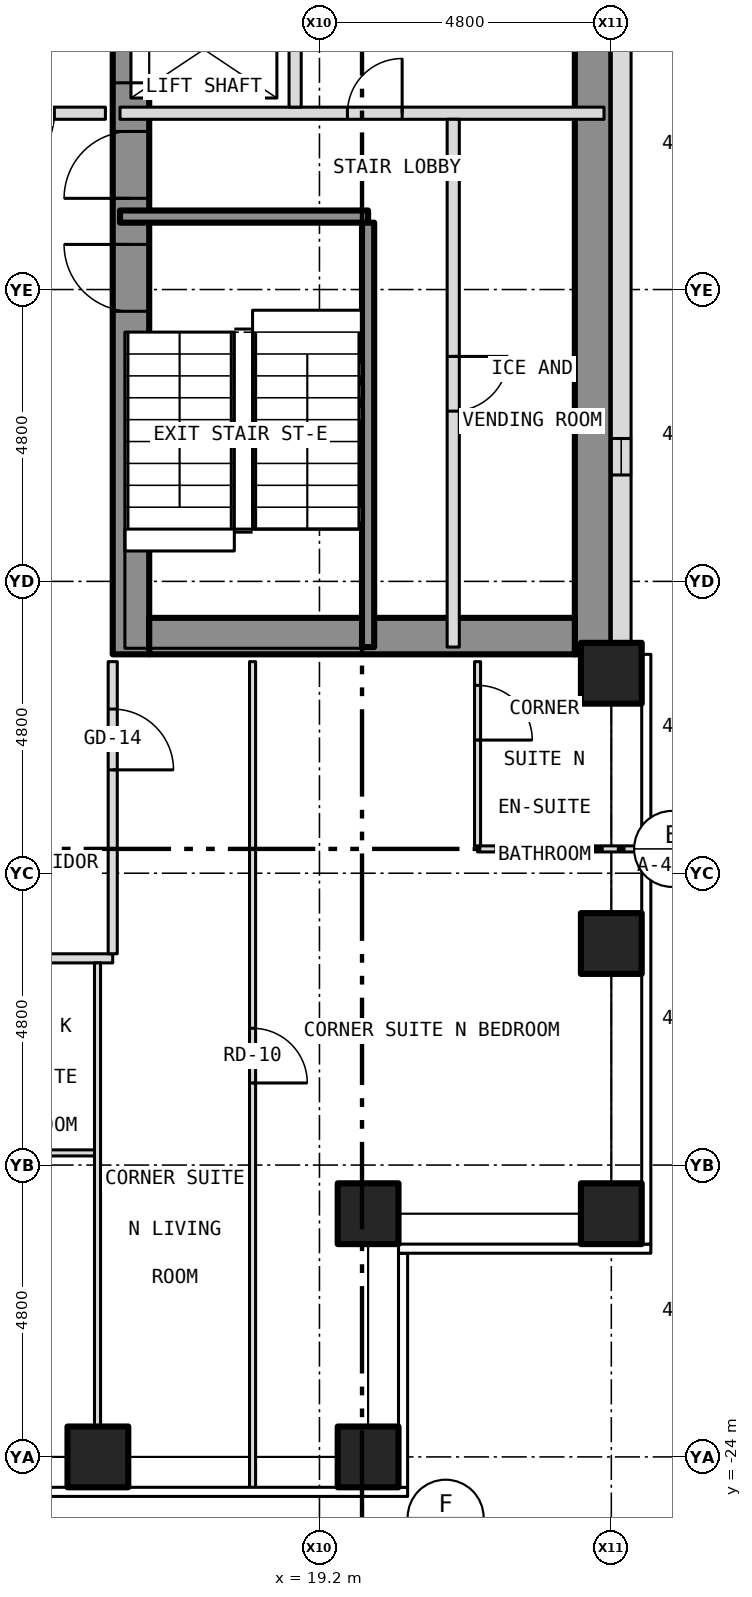
"""IFC4 building model, lengths in metres.
Left out: names, types, materials, properties, quantities, classifications, styles, units other than length and angle.
Written with IfcOpenShell. Run it as: python <this file> out.ifc"""

import sys

from ifc_helpers import new_model, si_unit, direction, frame, frame_2d, origin, origin_2d, place, context, subcontext, project, spatial, rectangle, hollow_rectangle, extrude, element, fill, save


model = new_model("IFC4")
c1 = context("Model", 3, precision=1e-05, world=origin(), true_north=direction((0.0, 1.0)))
c2 = subcontext(c1, "Body", "Model", "MODEL_VIEW")
j1 = project(units=[si_unit("LENGTHUNIT", "METRE"), si_unit("PLANEANGLEUNIT", "RADIAN")], contexts=[c1])
p1 = place(None, origin())
s1 = spatial("IfcSite", under=j1, at=p1, CompositionType="ELEMENT")
p2 = place(p1, origin())
s2 = spatial("IfcBuilding", under=s1, at=p2, CompositionType="ELEMENT")
p3 = place(p2, frame((0.0, 0.0, 49.5)))
s3 = spatial("IfcBuildingStorey", under=s2, at=p3, CompositionType="ELEMENT", Elevation=49.5)
for number, where, z_axis, x_axis in (
    (1, (15.556, -24.0, -0.15), (0.0, 0.0, 1.0), (1.0, 0.0, 0.0)),
    (2, (20.0, -24.0, -0.15), (0.0, 0.0, 1.0), (1.0, 0.0, 0.0)),
    (3, (24.0, -20.0, -0.15), (0.0, 0.0, 1.0), (1.0, 0.0, 0.0)),
    (4, (24.0, -15.556, -0.15), (0.0, 0.0, 1.0), (1.0, 0.0, 0.0)),
    (5, (24.0, -11.111, -0.15), (0.0, 0.0, 1.0), (1.0, 0.0, 0.0)),
    (6, (20.0, -20.0, -0.15), (0.0, 0.0, 1.0), (1.0, 0.0, 0.0)),
):
    element("IfcColumn", number, at=place(p3, frame(where, z_axis=z_axis, x_axis=x_axis)), inside=s3, PredefinedType="COLUMN", context=c2, shape_type="SweptSolid", body=[
        extrude(hollow_rectangle(XDim=1.0, YDim=1.0, WallThickness=0.06, at=origin_2d()), origin(), (0.0, 0.0, 1.0), 3.5),
    ])
p4 = place(p3, frame((16.1, -10.8, 0.0), z_axis=(0.0, 0.0, 1.0), x_axis=(0.0, 1.0, 0.0)))
e7 = element("IfcWall", 7, at=p4, inside=s3, PredefinedType="SHEAR", context=c2, shape_type="SweptSolid", body=[
    extrude(rectangle(XDim=21.6, YDim=0.6, at=frame_2d((10.8, 0.0))), origin(), (0.0, 0.0, 1.0), 3.25),
])
p5 = place(p4, frame((9.4, 0.0, 0.0)))
e8 = element("IfcOpeningElement", 8, at=p5, cuts=e7, PredefinedType="OPENING", context=c2, shape_type="SweptSolid", body=[
    extrude(rectangle(XDim=1.1, YDim=2.1, at=frame_2d((0.55, 1.05))), frame((0.0, 0.312, 0.0), z_axis=(0.0, -1.0, 0.0), x_axis=(1.0, 0.0, 0.0)), (0.0, 0.0, 1.0), 0.624),
])
p6 = place(p4, frame((11.5, 0.0, 0.0)))
e9 = element("IfcOpeningElement", 9, at=p6, cuts=e7, PredefinedType="OPENING", context=c2, shape_type="SweptSolid", body=[
    extrude(rectangle(XDim=1.1, YDim=2.1, at=frame_2d((0.55, 1.05))), frame((0.0, 0.312, 0.0), z_axis=(0.0, -1.0, 0.0), x_axis=(1.0, 0.0, 0.0)), (0.0, 0.0, 1.0), 0.624),
])
p7 = place(p4, frame((13.6, 0.0, 0.0)))
e10 = element("IfcOpeningElement", 10, at=p7, cuts=e7, PredefinedType="OPENING", context=c2, shape_type="SweptSolid", body=[
    extrude(rectangle(XDim=1.1, YDim=2.1, at=frame_2d((0.55, 1.05))), frame((0.0, 0.312, 0.0), z_axis=(0.0, -1.0, 0.0), x_axis=(1.0, 0.0, 0.0)), (0.0, 0.0, 1.0), 0.624),
])
p8 = place(p4, frame((15.7, 0.0, 0.0)))
e11 = element("IfcOpeningElement", 11, at=p8, cuts=e7, PredefinedType="OPENING", context=c2, shape_type="SweptSolid", body=[
    extrude(rectangle(XDim=1.1, YDim=2.1, at=frame_2d((0.55, 1.05))), frame((0.0, 0.312, 0.0), z_axis=(0.0, -1.0, 0.0), x_axis=(1.0, 0.0, 0.0)), (0.0, 0.0, 1.0), 0.624),
])
p9 = place(p4, frame((17.8, 0.0, 0.0)))
e12 = element("IfcOpeningElement", 12, at=p9, cuts=e7, PredefinedType="OPENING", context=c2, shape_type="SweptSolid", body=[
    extrude(rectangle(XDim=1.1, YDim=2.1, at=frame_2d((0.55, 1.05))), frame((0.0, 0.312, 0.0), z_axis=(0.0, -1.0, 0.0), x_axis=(1.0, 0.0, 0.0)), (0.0, 0.0, 1.0), 0.624),
])
p10 = place(p4, frame((5.642, 0.0, 0.0)))
e13 = element("IfcOpeningElement", 13, at=p10, cuts=e7, PredefinedType="OPENING", context=c2, shape_type="SweptSolid", body=[
    extrude(rectangle(XDim=1.1, YDim=2.1, at=frame_2d((0.55, 1.05))), frame((0.0, 0.312, 0.0), z_axis=(0.0, -1.0, 0.0), x_axis=(1.0, 0.0, 0.0)), (0.0, 0.0, 1.0), 0.624),
])
p11 = place(p4, frame((7.5, 0.0, 0.0)))
e14 = element("IfcOpeningElement", 14, at=p11, cuts=e7, PredefinedType="OPENING", context=c2, shape_type="SweptSolid", body=[
    extrude(rectangle(XDim=1.1, YDim=2.1, at=frame_2d((0.55, 1.05))), frame((0.0, 0.312, 0.0), z_axis=(0.0, -1.0, 0.0), x_axis=(1.0, 0.0, 0.0)), (0.0, 0.0, 1.0), 0.624),
])
p12 = place(p3, frame((23.7, -10.8, 0.0), z_axis=(0.0, 0.0, 1.0), x_axis=(0.0, 1.0, 0.0)))
e15 = element("IfcWall", 15, at=p12, inside=s3, PredefinedType="SHEAR", context=c2, shape_type="SweptSolid", body=[
    extrude(rectangle(XDim=21.6, YDim=0.6, at=frame_2d((10.8, 0.0))), origin(), (0.0, 0.0, 1.0), 3.25),
])
p13 = place(p3, frame((16.4, -10.5, 0.0), z_axis=(0.0, 0.0, 1.0), x_axis=(1.0, 0.0, 0.0)))
e16 = element("IfcWall", 16, at=p13, inside=s3, PredefinedType="SHEAR", context=c2, shape_type="SweptSolid", body=[
    extrude(rectangle(XDim=7.0, YDim=0.6, at=frame_2d((3.5, 0.0))), origin(), (0.0, 0.0, 1.0), 3.25),
])
p14 = place(p3, frame((24.163, -10.8, 0.0), z_axis=(0.0, 0.0, 1.0), x_axis=(0.0, 1.0, 0.0)))
e17 = element("IfcWall", 17, at=p14, inside=s3, PredefinedType="SOLIDWALL", context=c2, shape_type="SweptSolid", body=[
    extrude(rectangle(XDim=21.6, YDim=0.325, at=frame_2d((10.8, 0.0))), origin(), (0.0, 0.0, 1.0), 3.5),
])
p15 = place(p14, frame((2.95, 0.0, 1.0)))
e18 = element("IfcOpeningElement", 18, at=p15, cuts=e17, PredefinedType="OPENING", context=c2, shape_type="SweptSolid", body=[
    extrude(rectangle(XDim=0.6, YDim=1.5, at=frame_2d((0.3, 0.75))), frame((0.0, 0.175, 0.0), z_axis=(0.0, -1.0, 0.0), x_axis=(1.0, 0.0, 0.0)), (0.0, 0.0, 1.0), 0.349),
])
p16 = place(p3, frame((13.35, -19.0, 0.0), z_axis=(0.0, 0.0, 1.0), x_axis=(1.0, 0.0, 0.0)))
e19 = element("IfcWall", 19, at=p16, inside=s3, PredefinedType="PARTITIONING", context=c2, shape_type="SweptSolid", body=[
    extrude(rectangle(XDim=2.2, YDim=0.1, at=frame_2d((1.1, 0.0))), origin(), (0.0, 0.0, 1.0), 3.35),
])
p17 = place(p3, frame((-15.8, -15.8, 0.0), z_axis=(0.0, 0.0, 1.0), x_axis=(1.0, 0.0, 0.0)))
e20 = element("IfcWall", 20, at=p17, inside=s3, PredefinedType="PARTITIONING", context=c2, shape_type="SweptSolid", body=[
    extrude(rectangle(XDim=31.6, YDim=0.15, at=frame_2d((15.8, 0.0))), origin(), (0.0, 0.0, 1.0), 3.35),
])
p18 = place(p17, frame((3.067, 0.0, 0.0)))
e21 = element("IfcOpeningElement", 21, at=p18, cuts=e20, PredefinedType="OPENING", context=c2, shape_type="SweptSolid", body=[
    extrude(rectangle(XDim=1.0, YDim=2.1, at=frame_2d((0.5, 1.05))), frame((0.0, 0.087, 0.0), z_axis=(0.0, -1.0, 0.0), x_axis=(1.0, 0.0, 0.0)), (0.0, 0.0, 1.0), 0.174),
])
p19 = place(p17, frame((5.311, 0.0, 0.0)))
e22 = element("IfcOpeningElement", 22, at=p19, cuts=e20, PredefinedType="OPENING", context=c2, shape_type="SweptSolid", body=[
    extrude(rectangle(XDim=1.0, YDim=2.1, at=frame_2d((0.5, 1.05))), frame((0.0, 0.087, 0.0), z_axis=(0.0, -1.0, 0.0), x_axis=(1.0, 0.0, 0.0)), (0.0, 0.0, 1.0), 0.174),
])
p20 = place(p17, frame((9.756, 0.0, 0.0)))
e23 = element("IfcOpeningElement", 23, at=p20, cuts=e20, PredefinedType="OPENING", context=c2, shape_type="SweptSolid", body=[
    extrude(rectangle(XDim=1.0, YDim=2.1, at=frame_2d((0.5, 1.05))), frame((0.0, 0.087, 0.0), z_axis=(0.0, -1.0, 0.0), x_axis=(1.0, 0.0, 0.0)), (0.0, 0.0, 1.0), 0.174),
])
p21 = place(p17, frame((15.311, 0.0, 0.0)))
e24 = element("IfcOpeningElement", 24, at=p21, cuts=e20, PredefinedType="OPENING", context=c2, shape_type="SweptSolid", body=[
    extrude(rectangle(XDim=1.0, YDim=2.1, at=frame_2d((0.5, 1.05))), frame((0.0, 0.087, 0.0), z_axis=(0.0, -1.0, 0.0), x_axis=(1.0, 0.0, 0.0)), (0.0, 0.0, 1.0), 0.174),
])
p22 = place(p17, frame((22.245, 0.0, 0.0)))
e25 = element("IfcOpeningElement", 25, at=p22, cuts=e20, PredefinedType="OPENING", context=c2, shape_type="SweptSolid", body=[
    extrude(rectangle(XDim=1.0, YDim=2.1, at=frame_2d((0.5, 1.05))), frame((0.0, 0.087, 0.0), z_axis=(0.0, -1.0, 0.0), x_axis=(1.0, 0.0, 0.0)), (0.0, 0.0, 1.0), 0.174),
])
p23 = place(p3, frame((21.8, -14.0, 0.0), z_axis=(0.0, 0.0, 1.0), x_axis=(1.0, 0.0, 0.0)))
e26 = element("IfcWall", 26, at=p23, inside=s3, PredefinedType="PARTITIONING", context=c2, shape_type="SweptSolid", body=[
    extrude(rectangle(XDim=2.73, YDim=0.1, at=frame_2d((1.365, 0.0))), origin(), (0.0, 0.0, 1.0), 3.35),
])
p24 = place(p3, frame((15.92, -3.6, 0.0), z_axis=(0.0, 0.0, 1.0), x_axis=(1.0, 0.0, 0.0)))
e27 = element("IfcWall", 27, at=p24, inside=s3, PredefinedType="SHEAR", context=c2, shape_type="SweptSolid", body=[
    extrude(rectangle(XDim=4.08, YDim=0.2, at=frame_2d((2.04, 0.0))), origin(), (0.0, 0.0, 1.0), 3.25),
])
p25 = place(p3, frame((12.4, -1.9, 0.0), z_axis=(0.0, 0.0, 1.0), x_axis=(1.0, 0.0, 0.0)))
e28 = element("IfcWall", 28, at=p25, inside=s3, PredefinedType="PARTITIONING", context=c2, shape_type="SweptSolid", body=[
    extrude(rectangle(XDim=3.28, YDim=0.2, at=frame_2d((1.64, 0.0))), origin(), (0.0, 0.0, 1.0), 3.35),
])
p26 = place(p25, frame((1.34, 0.0, 0.0)))
e29 = element("IfcOpeningElement", 29, at=p26, cuts=e28, PredefinedType="OPENING", context=c2, shape_type="SweptSolid", body=[
    extrude(rectangle(XDim=1.1, YDim=2.1, at=frame_2d((0.55, 1.05))), frame((0.0, 0.112, 0.0), z_axis=(0.0, -1.0, 0.0), x_axis=(1.0, 0.0, 0.0)), (0.0, 0.0, 1.0), 0.224),
])
p27 = place(p3, frame((15.92, -1.9, 0.0), z_axis=(0.0, 0.0, 1.0), x_axis=(1.0, 0.0, 0.0)))
e30 = element("IfcWall", 30, at=p27, inside=s3, PredefinedType="PARTITIONING", context=c2, shape_type="SweptSolid", body=[
    extrude(rectangle(XDim=7.96, YDim=0.2, at=frame_2d((3.98, 0.0))), origin(), (0.0, 0.0, 1.0), 3.25),
])
p28 = place(p27, frame((3.74, 0.0, 0.0)))
e31 = element("IfcOpeningElement", 31, at=p28, cuts=e30, PredefinedType="OPENING", context=c2, shape_type="SweptSolid", body=[
    extrude(rectangle(XDim=0.9, YDim=2.1, at=frame_2d((0.45, 1.05))), frame((0.0, 0.112, 0.0), z_axis=(0.0, -1.0, 0.0), x_axis=(1.0, 0.0, 0.0)), (0.0, 0.0, 1.0), 0.224),
])
p29 = place(p3, frame((15.55, -23.88, 0.0), z_axis=(0.0, 0.0, 1.0), x_axis=(0.0, 1.0, 0.0)))
e32 = element("IfcWall", 32, at=p29, inside=s3, PredefinedType="PARTITIONING", context=c2, shape_type="SweptSolid", body=[
    extrude(rectangle(XDim=8.005, YDim=0.1, at=frame_2d((4.002, 0.0))), origin(), (0.0, 0.0, 1.0), 3.35),
])
p30 = place(p3, frame((15.8, -15.725, 0.0), z_axis=(0.0, 0.0, 1.0), x_axis=(0.0, 1.0, 0.0)))
e33 = element("IfcWall", 33, at=p30, inside=s3, PredefinedType="PARTITIONING", context=c2, shape_type="SweptSolid", body=[
    extrude(rectangle(XDim=4.805, YDim=0.15, at=frame_2d((2.403, 0.0))), origin(), (0.0, 0.0, 1.0), 3.35),
])
p31 = place(p30, frame((3.025, 0.0, 0.0)))
e34 = element("IfcOpeningElement", 34, at=p31, cuts=e33, PredefinedType="OPENING", context=c2, shape_type="SweptSolid", body=[
    extrude(rectangle(XDim=1.0, YDim=2.1, at=frame_2d((0.5, 1.05))), frame((0.0, 0.087, 0.0), z_axis=(0.0, -1.0, 0.0), x_axis=(1.0, 0.0, 0.0)), (0.0, 0.0, 1.0), 0.174),
])
p32 = place(p3, frame((18.1, -24.53, 0.0), z_axis=(0.0, 0.0, 1.0), x_axis=(0.0, 1.0, 0.0)))
e35 = element("IfcWall", 35, at=p32, inside=s3, PredefinedType="PARTITIONING", context=c2, shape_type="SweptSolid", body=[
    extrude(rectangle(XDim=13.61, YDim=0.1, at=frame_2d((6.805, 0.0))), origin(), (0.0, 0.0, 1.0), 3.35),
])
p33 = place(p32, frame((6.68, 0.0, 0.0)))
e36 = element("IfcOpeningElement", 36, at=p33, cuts=e35, PredefinedType="OPENING", context=c2, shape_type="SweptSolid", body=[
    extrude(rectangle(XDim=0.9, YDim=2.1, at=frame_2d((0.45, 1.05))), frame((0.0, 0.062, 0.0), z_axis=(0.0, -1.0, 0.0), x_axis=(1.0, 0.0, 0.0)), (0.0, 0.0, 1.0), 0.124),
])
p34 = place(p3, frame((18.8, -1.8, 0.0), z_axis=(0.0, 0.0, 1.0), x_axis=(0.0, 1.0, 0.0)))
e37 = element("IfcWall", 37, at=p34, inside=s3, PredefinedType="PARTITIONING", context=c2, shape_type="SweptSolid", body=[
    extrude(rectangle(XDim=6.15, YDim=0.2, at=frame_2d((3.075, 0.0))), origin(), (0.0, 0.0, 1.0), 3.25),
])
p35 = place(p3, frame((20.0, -10.68, 0.0), z_axis=(0.0, 0.0, 1.0), x_axis=(0.0, 1.0, 0.0)))
e38 = element("IfcWall", 38, at=p35, inside=s3, PredefinedType="SHEAR", context=c2, shape_type="SweptSolid", body=[
    extrude(rectangle(XDim=6.98, YDim=0.2, at=frame_2d((3.49, 0.0))), origin(), (0.0, 0.0, 1.0), 3.25),
])
p36 = place(p3, frame((21.4, -10.68, 0.0), z_axis=(0.0, 0.0, 1.0), x_axis=(0.0, 1.0, 0.0)))
e39 = element("IfcWall", 39, at=p36, inside=s3, PredefinedType="PARTITIONING", context=c2, shape_type="SweptSolid", body=[
    extrude(rectangle(XDim=8.68, YDim=0.2, at=frame_2d((4.34, 0.0))), origin(), (0.0, 0.0, 1.0), 3.25),
])
p37 = place(p36, frame((3.88, 0.0, 0.0)))
e40 = element("IfcOpeningElement", 40, at=p37, cuts=e39, PredefinedType="OPENING", context=c2, shape_type="SweptSolid", body=[
    extrude(rectangle(XDim=0.9, YDim=2.1, at=frame_2d((0.45, 1.05))), frame((0.0, 0.112, 0.0), z_axis=(0.0, -1.0, 0.0), x_axis=(1.0, 0.0, 0.0)), (0.0, 0.0, 1.0), 0.224),
])
p38 = place(p3, frame((21.8, -13.95, 0.0), z_axis=(0.0, 0.0, 1.0), x_axis=(0.0, 1.0, 0.0)))
e41 = element("IfcWall", 41, at=p38, inside=s3, PredefinedType="PARTITIONING", context=c2, shape_type="SweptSolid", body=[
    extrude(rectangle(XDim=3.03, YDim=0.1, at=frame_2d((1.515, 0.0))), origin(), (0.0, 0.0, 1.0), 3.35),
])
p39 = place(p38, frame((1.74, 0.0, 0.0)))
e42 = element("IfcOpeningElement", 42, at=p39, cuts=e41, PredefinedType="OPENING", context=c2, shape_type="SweptSolid", body=[
    extrude(rectangle(XDim=0.9, YDim=2.1, at=frame_2d((0.45, 1.05))), frame((0.0, 0.062, 0.0), z_axis=(0.0, -1.0, 0.0), x_axis=(1.0, 0.0, 0.0)), (0.0, 0.0, 1.0), 0.124),
])
p40 = place(p15, origin())
e43 = element("IfcWindow", 43, at=p40, inside=s3, PartitioningType="SINGLE_PANEL", PredefinedType="WINDOW", context=c2, shape_type="SweptSolid", body=[
    extrude(rectangle(XDim=0.6, YDim=1.5, at=frame_2d((0.3, 0.75))), frame((0.0, -0.073, 0.0), z_axis=(0.0, -1.0, 0.0), x_axis=(1.0, 0.0, 0.0)), (0.0, 0.0, 1.0), 0.06),
])
fill(e18, e43)
p41 = place(p5, origin())
e44 = element("IfcDoor", 44, at=p41, inside=s3, OperationType="SLIDING_TO_LEFT", PredefinedType="DOOR", context=c2, shape_type="SweptSolid", body=[
    extrude(rectangle(XDim=1.1, YDim=2.1, at=frame_2d((0.55, 1.05))), frame((0.0, 0.025, 0.0), z_axis=(0.0, -1.0, 0.0), x_axis=(1.0, 0.0, 0.0)), (0.0, 0.0, 1.0), 0.05),
])
fill(e8, e44)
p42 = place(p10, origin())
e45 = element("IfcDoor", 45, at=p42, inside=s3, OperationType="SINGLE_SWING_RIGHT", PredefinedType="DOOR", context=c2, shape_type="SweptSolid", body=[
    extrude(rectangle(XDim=1.1, YDim=2.1, at=frame_2d((0.55, 1.05))), frame((0.0, 0.025, 0.0), z_axis=(0.0, -1.0, 0.0), x_axis=(1.0, 0.0, 0.0)), (0.0, 0.0, 1.0), 0.05),
])
fill(e13, e45)
p43 = place(p11, origin())
e46 = element("IfcDoor", 46, at=p43, inside=s3, OperationType="SINGLE_SWING_LEFT", PredefinedType="DOOR", context=c2, shape_type="SweptSolid", body=[
    extrude(rectangle(XDim=1.1, YDim=2.1, at=frame_2d((0.55, 1.05))), frame((0.0, 0.025, 0.0), z_axis=(0.0, -1.0, 0.0), x_axis=(1.0, 0.0, 0.0)), (0.0, 0.0, 1.0), 0.05),
])
fill(e14, e46)
p44 = place(p37, origin())
e47 = element("IfcDoor", 47, at=p44, inside=s3, OperationType="SINGLE_SWING_RIGHT", PredefinedType="DOOR", context=c2, shape_type="SweptSolid", body=[
    extrude(rectangle(XDim=0.9, YDim=2.1, at=frame_2d((0.45, 1.05))), frame((0.0, 0.025, 0.0), z_axis=(0.0, -1.0, 0.0), x_axis=(1.0, 0.0, 0.0)), (0.0, 0.0, 1.0), 0.05),
])
fill(e40, e47)
p45 = place(p28, origin())
e48 = element("IfcDoor", 48, at=p45, inside=s3, OperationType="SINGLE_SWING_RIGHT", PredefinedType="DOOR", context=c2, shape_type="SweptSolid", body=[
    extrude(rectangle(XDim=0.9, YDim=2.1, at=frame_2d((0.45, 1.05))), frame((0.0, 0.025, 0.0), z_axis=(0.0, -1.0, 0.0), x_axis=(1.0, 0.0, 0.0)), (0.0, 0.0, 1.0), 0.05),
])
fill(e31, e48)
p46 = place(p26, origin())
e49 = element("IfcDoor", 49, at=p46, inside=s3, OperationType="SINGLE_SWING_LEFT", PredefinedType="DOOR", context=c2, shape_type="SweptSolid", body=[
    extrude(rectangle(XDim=1.1, YDim=2.1, at=frame_2d((0.55, 1.05))), frame((0.0, 0.025, 0.0), z_axis=(0.0, -1.0, 0.0), x_axis=(1.0, 0.0, 0.0)), (0.0, 0.0, 1.0), 0.05),
])
fill(e29, e49)
p47 = place(p31, origin())
e50 = element("IfcDoor", 50, at=p47, inside=s3, OperationType="SINGLE_SWING_LEFT", PredefinedType="DOOR", context=c2, shape_type="SweptSolid", body=[
    extrude(rectangle(XDim=1.0, YDim=2.1, at=frame_2d((0.5, 1.05))), frame((0.0, 0.025, 0.0), z_axis=(0.0, -1.0, 0.0), x_axis=(1.0, 0.0, 0.0)), (0.0, 0.0, 1.0), 0.05),
])
fill(e34, e50)
p48 = place(p33, origin())
e51 = element("IfcDoor", 51, at=p48, inside=s3, OperationType="SINGLE_SWING_LEFT", PredefinedType="DOOR", context=c2, shape_type="SweptSolid", body=[
    extrude(rectangle(XDim=0.9, YDim=2.1, at=frame_2d((0.45, 1.05))), frame((0.0, 0.025, 0.0), z_axis=(0.0, -1.0, 0.0), x_axis=(1.0, 0.0, 0.0)), (0.0, 0.0, 1.0), 0.05),
])
fill(e36, e51)
p49 = place(p39, origin())
e52 = element("IfcDoor", 52, at=p49, inside=s3, OperationType="SINGLE_SWING_LEFT", PredefinedType="DOOR", context=c2, shape_type="SweptSolid", body=[
    extrude(rectangle(XDim=0.9, YDim=2.1, at=frame_2d((0.45, 1.05))), frame((0.0, 0.025, 0.0), z_axis=(0.0, -1.0, 0.0), x_axis=(1.0, 0.0, 0.0)), (0.0, 0.0, 1.0), 0.05),
])
fill(e42, e52)
save(model, sys.argv[1])
